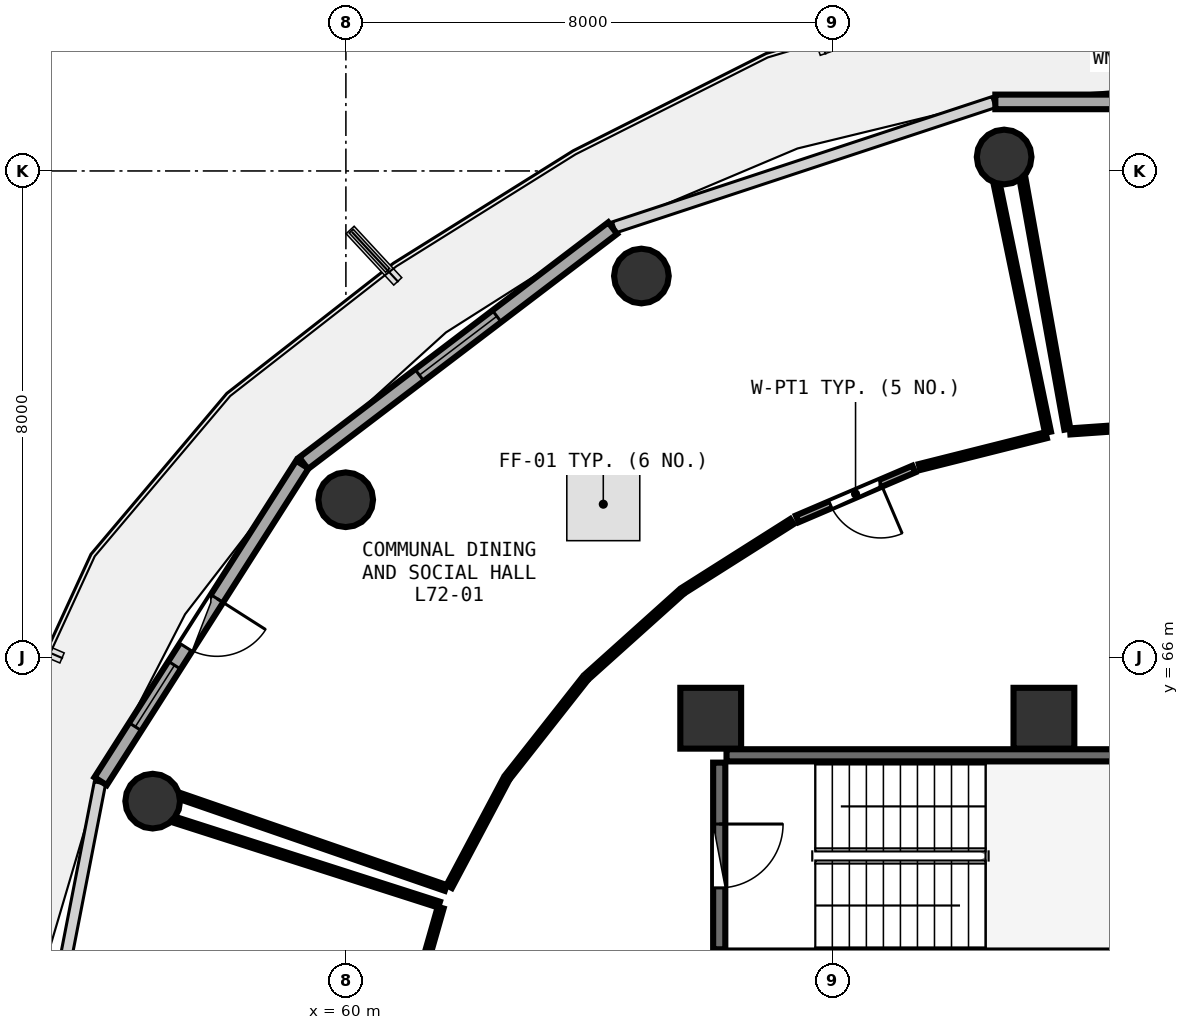
"""IFC4 building model, lengths in metres.
Left out: names, types, materials, properties, quantities, classifications, styles, units other than length and angle.
Written with IfcOpenShell. Run it as: python <this file> out.ifc"""

import sys

from ifc_helpers import new_model, si_unit, direction, frame, frame_2d, origin, origin_2d, place, context, subcontext, project, spatial, rectangle, circle, extrude, element, fill, save


model = new_model("IFC4")
c1 = context("Model", 3, precision=1e-05, world=origin(), true_north=direction((0.0, 1.0)))
c2 = subcontext(c1, "Body", "Model", "MODEL_VIEW")
j1 = project(units=[si_unit("LENGTHUNIT", "METRE"), si_unit("PLANEANGLEUNIT", "RADIAN")], contexts=[c1])
p1 = place(None, origin())
s1 = spatial("IfcSite", under=j1, at=p1, CompositionType="ELEMENT")
p2 = place(p1, origin())
s2 = spatial("IfcBuilding", under=s1, at=p2, CompositionType="ELEMENT")
p3 = place(p2, frame((0.0, 0.0, 282.45)))
s3 = spatial("IfcBuildingStorey", under=s2, at=p3, CompositionType="ELEMENT", Elevation=282.45)
for number, where, z_axis, x_axis in (
    (1, (71.48, 65.0, 0.0), (0.0, 0.0, 1.0), (1.0, 0.0, 0.0)),
    (2, (66.0, 65.0, 0.0), (0.0, 0.0, 1.0), (1.0, 0.0, 0.0)),
):
    element("IfcColumn", number, at=place(p3, frame(where, z_axis=z_axis, x_axis=x_axis)), inside=s3, PredefinedType="PILASTER", context=c2, shape_type="SweptSolid", body=[
        extrude(rectangle(XDim=1.0, YDim=1.0, at=origin_2d()), origin(), (0.0, 0.0, 1.0), 3.75),
    ])
for number, where, z_axis, x_axis in (
    (3, (70.826, 74.229, 0.0), (0.0, 0.0, 1.0), (1.0, 0.0, 0.0)),
    (4, (64.86, 72.272, 0.0), (0.0, 0.0, 1.0), (1.0, 0.0, 0.0)),
    (5, (59.997, 68.593, 0.0), (0.0, 0.0, 1.0), (1.0, 0.0, 0.0)),
    (6, (56.823, 63.636, 0.0), (0.0, 0.0, 1.0), (1.0, 0.0, 0.0)),
):
    element("IfcColumn", number, at=place(p3, frame(where, z_axis=z_axis, x_axis=x_axis)), inside=s3, PredefinedType="COLUMN", context=c2, shape_type="SweptSolid", body=[
        extrude(circle(Radius=0.45, at=origin_2d()), origin(), (0.0, 0.0, 1.0), 3.75),
    ])
p4 = place(p3, frame((77.319, 75.136, 0.0), z_axis=(0.0, 0.0, 1.0), x_axis=(-1.0, 0.0, 0.0)))
e7 = element("IfcWall", 7, at=p4, inside=s3, PredefinedType="SOLIDWALL", context=c2, shape_type="SweptSolid", body=[
    extrude(rectangle(XDim=6.638, YDim=0.24, at=frame_2d((3.319, 0.0))), origin(), (0.0, 0.0, 1.0), 3.475),
])
p5 = place(p4, frame((2.519, 0.0, 0.85)))
e8 = element("IfcOpeningElement", 8, at=p5, cuts=e7, PredefinedType="OPENING", context=c2, shape_type="SweptSolid", body=[
    extrude(rectangle(XDim=1.6, YDim=1.45, at=frame_2d((0.8, 0.725))), frame((0.0, 0.13, 0.0), z_axis=(0.0, -1.0, 0.0), x_axis=(1.0, 0.0, 0.0)), (0.0, 0.0, 1.0), 0.26),
])
p6 = place(p3, frame((64.388, 73.06, 0.0), z_axis=(0.0, 0.0, 1.0), x_axis=(-0.796010444211, -0.605282886514, 0.0)))
e9 = element("IfcWall", 9, at=p6, inside=s3, PredefinedType="SOLIDWALL", context=c2, shape_type="SweptSolid", body=[
    extrude(rectangle(XDim=6.387, YDim=0.24, at=frame_2d((3.194, 0.0))), origin(), (0.0, 0.0, 1.0), 3.475),
])
p7 = place(p6, frame((2.394, 0.0, 0.85)))
e10 = element("IfcOpeningElement", 10, at=p7, cuts=e9, PredefinedType="OPENING", context=c2, shape_type="SweptSolid", body=[
    extrude(rectangle(XDim=1.6, YDim=1.45, at=frame_2d((0.8, 0.725))), frame((0.0, 0.13, 0.0), z_axis=(0.0, -1.0, 0.0), x_axis=(1.0, 0.0, 0.0)), (0.0, 0.0, 1.0), 0.26),
])
p8 = place(p3, frame((59.284, 69.172, 0.0), z_axis=(0.0, 0.0, 1.0), x_axis=(-0.537271968456, -0.843409053728, 0.0)))
e11 = element("IfcWall", 11, at=p8, inside=s3, PredefinedType="SOLIDWALL", context=c2, shape_type="SweptSolid", body=[
    extrude(rectangle(XDim=6.175, YDim=0.24, at=frame_2d((3.087, 0.0))), origin(), (0.0, 0.0, 1.0), 3.475),
])
p9 = place(p8, frame((2.613, 0.0, 0.0)))
e12 = element("IfcOpeningElement", 12, at=p9, cuts=e11, PredefinedType="OPENING", context=c2, shape_type="SweptSolid", body=[
    extrude(rectangle(XDim=0.95, YDim=2.1, at=frame_2d((0.475, 1.05))), frame((0.0, 0.13, 0.0), z_axis=(0.0, -1.0, 0.0), x_axis=(1.0, 0.0, 0.0)), (0.0, 0.0, 1.0), 0.26),
])
p10 = place(p8, frame((3.913, 0.0, 0.85)))
e13 = element("IfcOpeningElement", 13, at=p10, cuts=e11, PredefinedType="OPENING", context=c2, shape_type="SweptSolid", body=[
    extrude(rectangle(XDim=1.2, YDim=1.45, at=frame_2d((0.6, 0.725))), frame((0.0, 0.13, 0.0), z_axis=(0.0, -1.0, 0.0), x_axis=(1.0, 0.0, 0.0)), (0.0, 0.0, 1.0), 0.26),
])
p11 = place(p3, frame((73.42, 64.39, 0.0), z_axis=(0.0, 0.0, 1.0), x_axis=(-1.0, 0.0, 0.0)))
e14 = element("IfcWall", 14, at=p11, inside=s3, PredefinedType="SHEAR", context=c2, shape_type="SweptSolid", body=[
    extrude(rectangle(XDim=7.16, YDim=0.2, at=frame_2d((3.58, 0.0))), origin(), (0.0, 0.0, 1.0), 3.49),
])
p12 = place(p3, frame((66.14, 64.27, 0.0), z_axis=(0.0, 0.0, 1.0), x_axis=(0.0, -1.0, 0.0)))
e15 = element("IfcWall", 15, at=p12, inside=s3, PredefinedType="SHEAR", context=c2, shape_type="SweptSolid", body=[
    extrude(rectangle(XDim=3.07, YDim=0.2, at=frame_2d((1.535, 0.0))), origin(), (0.0, 0.0, 1.0), 3.49),
])
p13 = place(p12, frame((1.01, 0.0, 0.0)))
e16 = element("IfcOpeningElement", 16, at=p13, cuts=e15, PredefinedType="OPENING", context=c2, shape_type="SweptSolid", body=[
    extrude(rectangle(XDim=1.05, YDim=2.1, at=frame_2d((0.525, 1.05))), frame((0.0, 0.11, 0.0), z_axis=(0.0, -1.0, 0.0), x_axis=(1.0, 0.0, 0.0)), (0.0, 0.0, 1.0), 0.22),
])
p14 = place(p3, frame((69.34, 69.097, 0.0), z_axis=(0.0, 0.0, 1.0), x_axis=(-0.919508345424, -0.39307048057, 0.0)))
e17 = element("IfcWall", 17, at=p14, inside=s3, PredefinedType="PARTITIONING", context=c2, shape_type="SweptSolid", body=[
    extrude(rectangle(XDim=2.083, YDim=0.12, at=frame_2d((1.042, 0.0))), origin(), (0.0, 0.0, 1.0), 3.48),
])
p15 = place(p14, frame((0.592, 0.0, 0.0)))
e18 = element("IfcOpeningElement", 18, at=p15, cuts=e17, PredefinedType="OPENING", context=c2, shape_type="SweptSolid", body=[
    extrude(rectangle(XDim=0.9, YDim=2.08, at=frame_2d((0.45, 1.04))), frame((0.0, 0.07, 0.0), z_axis=(0.0, -1.0, 0.0), x_axis=(1.0, 0.0, 0.0)), (0.0, 0.0, 1.0), 0.14),
])
p16 = place(p3, frame((71.516, 69.654, 0.0), z_axis=(0.0, 0.0, 1.0), x_axis=(-0.969827312174, -0.243792913272, 0.0)))
e19 = element("IfcWall", 19, at=p16, inside=s3, PredefinedType="PARTITIONING", context=c2, shape_type="SweptSolid", body=[
    extrude(rectangle(XDim=2.147, YDim=0.1, at=frame_2d((1.073, 0.0))), origin(), (0.0, 0.0, 1.0), 3.075),
])
p17 = place(p3, frame((67.335, 68.234, 0.0), z_axis=(0.0, 0.0, 1.0), x_axis=(-0.844856002064, -0.534993771717, 0.0)))
e20 = element("IfcWall", 20, at=p17, inside=s3, PredefinedType="PARTITIONING", context=c2, shape_type="SweptSolid", body=[
    extrude(rectangle(XDim=2.092, YDim=0.1, at=frame_2d((1.046, 0.0))), origin(), (0.0, 0.0, 1.0), 3.075),
])
p18 = place(p3, frame((65.504, 67.066, 0.0), z_axis=(0.0, 0.0, 1.0), x_axis=(-0.743943808924, -0.668242178527, 0.0)))
e21 = element("IfcWall", 21, at=p18, inside=s3, PredefinedType="PARTITIONING", context=c2, shape_type="SweptSolid", body=[
    extrude(rectangle(XDim=2.054, YDim=0.1, at=frame_2d((1.027, 0.0))), origin(), (0.0, 0.0, 1.0), 3.075),
])
p19 = place(p3, frame((63.921, 65.635, 0.0), z_axis=(0.0, 0.0, 1.0), x_axis=(-0.618820199788, -0.785532660259, 0.0)))
e22 = element("IfcWall", 22, at=p19, inside=s3, PredefinedType="PARTITIONING", context=c2, shape_type="SweptSolid", body=[
    extrude(rectangle(XDim=2.018, YDim=0.1, at=frame_2d((1.009, 0.0))), origin(), (0.0, 0.0, 1.0), 3.075),
])
p20 = place(p3, frame((62.629, 63.984, 0.0), z_axis=(0.0, 0.0, 1.0), x_axis=(-0.468933294906, -0.883233584579, 0.0)))
e23 = element("IfcWall", 23, at=p20, inside=s3, PredefinedType="PARTITIONING", context=c2, shape_type="SweptSolid", body=[
    extrude(rectangle(XDim=1.984, YDim=0.1, at=frame_2d((0.992, 0.0))), origin(), (0.0, 0.0, 1.0), 3.235),
])
p21 = place(p3, frame((61.642, 62.209, 0.0), z_axis=(0.0, 0.0, 1.0), x_axis=(-0.945103281494, 0.326771766388, 0.0)))
e24 = element("IfcWall", 24, at=p21, inside=s3, PredefinedType="PARTITIONING", context=c2, shape_type="SweptSolid", body=[
    extrude(rectangle(XDim=4.604, YDim=0.1, at=frame_2d((2.302, 0.0))), origin(), (0.0, 0.0, 1.0), 3.075),
])
p22 = place(p3, frame((70.707, 73.77, 0.0), z_axis=(0.0, 0.0, 1.0), x_axis=(0.202308141573, -0.979321916355, 0.0)))
e25 = element("IfcWall", 25, at=p22, inside=s3, PredefinedType="PARTITIONING", context=c2, shape_type="SweptSolid", body=[
    extrude(rectangle(XDim=4.153, YDim=0.1, at=frame_2d((2.076, 0.0))), origin(), (0.0, 0.0, 1.0), 3.075),
])
p23 = place(p3, frame((61.559, 61.885, 0.0), z_axis=(0.0, 0.0, 1.0), x_axis=(-0.274226302341, -0.961665188673, 0.0)))
e26 = element("IfcWall", 26, at=p23, inside=s3, PredefinedType="PARTITIONING", context=c2, shape_type="SweptSolid", body=[
    extrude(rectangle(XDim=1.955, YDim=0.1, at=frame_2d((0.978, 0.0))), origin(), (0.0, 0.0, 1.0), 3.48),
])
p24 = place(p3, frame((57.184, 63.329, 0.0), z_axis=(0.0, 0.0, 1.0), x_axis=(0.95227750557, -0.305233602976, 0.0)))
e27 = element("IfcWall", 27, at=p24, inside=s3, PredefinedType="PARTITIONING", context=c2, shape_type="SweptSolid", body=[
    extrude(rectangle(XDim=4.565, YDim=0.1, at=frame_2d((2.283, 0.0))), origin(), (0.0, 0.0, 1.0), 3.175),
])
p25 = place(p3, frame((74.067, 69.867, 0.0), z_axis=(0.0, 0.0, 1.0), x_axis=(-0.997574370957, -0.069608723664, 0.0)))
e28 = element("IfcWall", 28, at=p25, inside=s3, PredefinedType="PARTITIONING", context=c2, shape_type="SweptSolid", body=[
    extrude(rectangle(XDim=2.16, YDim=0.1, at=frame_2d((1.08, 0.0))), origin(), (0.0, 0.0, 1.0), 3.48),
])
p26 = place(p3, frame((71.865, 69.753, 0.0), z_axis=(0.0, 0.0, 1.0), x_axis=(-0.176199339585, 0.984354505618, 0.0)))
e29 = element("IfcWall", 29, at=p26, inside=s3, PredefinedType="PARTITIONING", context=c2, shape_type="SweptSolid", body=[
    extrude(rectangle(XDim=4.176, YDim=0.1, at=frame_2d((2.088, 0.0))), origin(), (0.0, 0.0, 1.0), 3.175),
])
p27 = place(p7, origin())
e30 = element("IfcWindow", 30, at=p27, inside=s3, PartitioningType="SINGLE_PANEL", PredefinedType="WINDOW", context=c2, shape_type="SweptSolid", body=[
    extrude(rectangle(XDim=1.6, YDim=1.45, at=frame_2d((0.8, 0.725))), frame((0.0, 0.03, 0.0), z_axis=(0.0, -1.0, 0.0), x_axis=(1.0, 0.0, 0.0)), (0.0, 0.0, 1.0), 0.06),
])
fill(e10, e30)
p28 = place(p9, frame((0.95, 0.0, 0.0), z_axis=(0.0, 0.0, 1.0), x_axis=(-1.0, 0.0, 0.0)))
e31 = element("IfcDoor", 31, at=p28, inside=s3, OperationType="SINGLE_SWING_RIGHT", PredefinedType="DOOR", context=c2, shape_type="SweptSolid", body=[
    extrude(rectangle(XDim=0.95, YDim=2.1, at=frame_2d((0.475, 1.05))), frame((0.0, 0.025, 0.0), z_axis=(0.0, -1.0, 0.0), x_axis=(1.0, 0.0, 0.0)), (0.0, 0.0, 1.0), 0.05),
])
fill(e12, e31)
p29 = place(p10, origin())
e32 = element("IfcWindow", 32, at=p29, inside=s3, PartitioningType="SINGLE_PANEL", PredefinedType="WINDOW", context=c2, shape_type="SweptSolid", body=[
    extrude(rectangle(XDim=1.2, YDim=1.45, at=frame_2d((0.6, 0.725))), frame((0.0, 0.03, 0.0), z_axis=(0.0, -1.0, 0.0), x_axis=(1.0, 0.0, 0.0)), (0.0, 0.0, 1.0), 0.06),
])
fill(e13, e32)
p30 = place(p13, origin())
e33 = element("IfcDoor", 33, at=p30, inside=s3, OperationType="SINGLE_SWING_LEFT", PredefinedType="DOOR", context=c2, shape_type="SweptSolid", body=[
    extrude(rectangle(XDim=1.05, YDim=2.1, at=frame_2d((0.525, 1.05))), frame((0.0, 0.025, 0.0), z_axis=(0.0, -1.0, 0.0), x_axis=(1.0, 0.0, 0.0)), (0.0, 0.0, 1.0), 0.05),
])
fill(e16, e33)
p31 = place(p15, origin())
e34 = element("IfcDoor", 34, at=p31, inside=s3, OperationType="SINGLE_SWING_LEFT", PredefinedType="DOOR", context=c2, shape_type="SweptSolid", body=[
    extrude(rectangle(XDim=0.9, YDim=2.08, at=frame_2d((0.45, 1.04))), frame((0.0, 0.025, 0.0), z_axis=(0.0, -1.0, 0.0), x_axis=(1.0, 0.0, 0.0)), (0.0, 0.0, 1.0), 0.05),
])
fill(e18, e34)
save(model, sys.argv[1])
